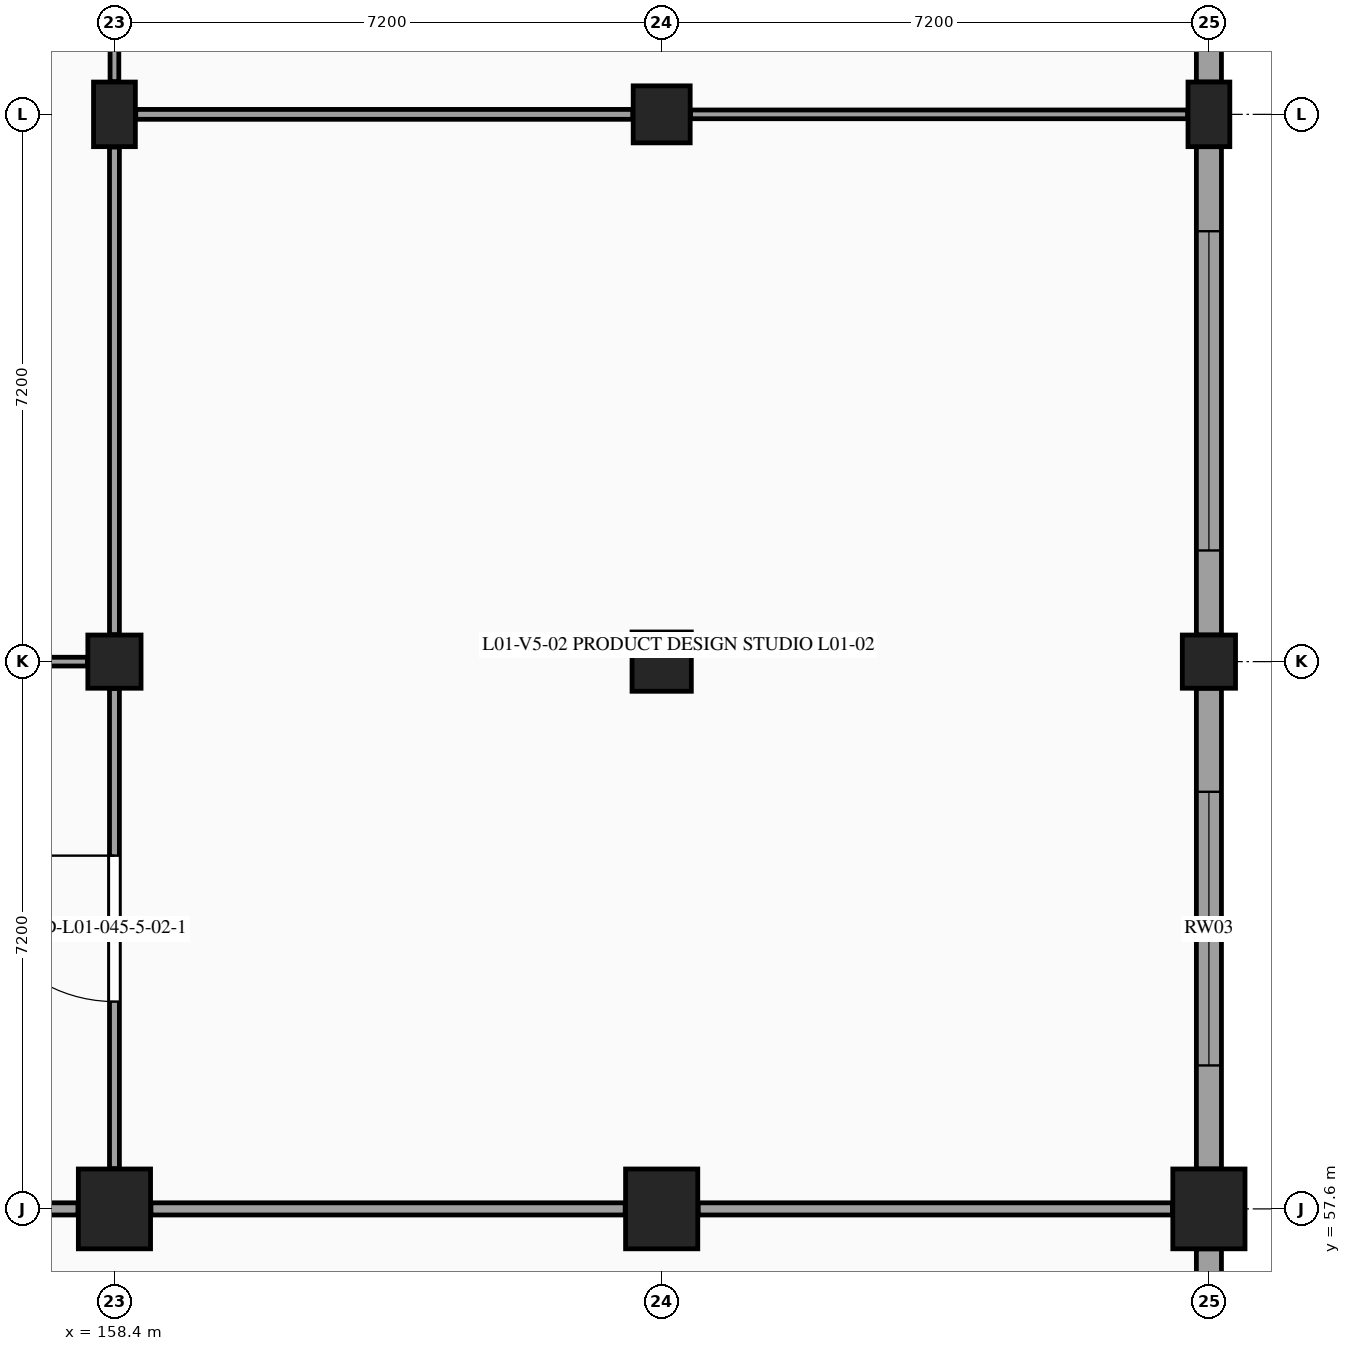
"""IFC4 building model, lengths in metres.
Left out: names, types, materials, properties, quantities, classifications, styles, units other than length and angle.
Written with IfcOpenShell. Run it as: python <this file> out.ifc"""

import sys

from ifc_helpers import new_model, si_unit, direction, frame, frame_2d, origin, origin_2d, place, context, subcontext, project, spatial, rectangle, extrude, element, fill, save


model = new_model("IFC4")
c1 = context("Model", 3, precision=1e-05, world=origin(), true_north=direction((0.0, 1.0)))
c2 = subcontext(c1, "Body", "Model", "MODEL_VIEW")
j1 = project(units=[si_unit("LENGTHUNIT", "METRE"), si_unit("PLANEANGLEUNIT", "RADIAN")], contexts=[c1])
p1 = place(None, origin())
s1 = spatial("IfcSite", under=j1, at=p1, CompositionType="ELEMENT")
p2 = place(p1, origin())
s2 = spatial("IfcBuilding", under=s1, at=p2, CompositionType="ELEMENT")
p3 = place(p2, frame((0.0, 0.0, 5.4)))
s3 = spatial("IfcBuildingStorey", under=s2, at=p3, CompositionType="ELEMENT", Elevation=5.4)
p4 = place(p3, frame((158.4, 57.6, 0.0), z_axis=(0.0, 0.0, 1.0), x_axis=(1.0, 0.0, 0.0)))
e1 = element("IfcColumn", 1, at=p4, inside=s3, PredefinedType="COLUMN", context=c2, shape_type="SweptSolid", body=[
    extrude(rectangle(XDim=0.95, YDim=1.05, at=origin_2d()), origin(), (0.0, 0.0, 1.0), 4.5),
])
p5 = place(p3, frame((158.4, 64.8, 0.0), z_axis=(0.0, 0.0, 1.0), x_axis=(1.0, 0.0, 0.0)))
e2 = element("IfcColumn", 2, at=p5, inside=s3, PredefinedType="COLUMN", context=c2, shape_type="SweptSolid", body=[
    extrude(rectangle(XDim=0.7, YDim=0.7, at=origin_2d()), origin(), (0.0, 0.0, 1.0), 4.5),
])
p6 = place(p3, frame((158.4, 72.0, 0.0), z_axis=(0.0, 0.0, 1.0), x_axis=(1.0, 0.0, 0.0)))
e3 = element("IfcColumn", 3, at=p6, inside=s3, PredefinedType="COLUMN", context=c2, shape_type="SweptSolid", body=[
    extrude(rectangle(XDim=0.55, YDim=0.85, at=origin_2d()), origin(), (0.0, 0.0, 1.0), 4.5),
])
p7 = place(p3, frame((165.6, 57.6, 0.0), z_axis=(0.0, 0.0, 1.0), x_axis=(1.0, 0.0, 0.0)))
e4 = element("IfcColumn", 4, at=p7, inside=s3, PredefinedType="COLUMN", context=c2, shape_type="SweptSolid", body=[
    extrude(rectangle(XDim=0.95, YDim=1.05, at=origin_2d()), origin(), (0.0, 0.0, 1.0), 4.5),
])
p8 = place(p3, frame((165.6, 64.8, 0.0), z_axis=(0.0, 0.0, 1.0), x_axis=(1.0, 0.0, 0.0)))
e5 = element("IfcColumn", 5, at=p8, inside=s3, PredefinedType="COLUMN", context=c2, shape_type="SweptSolid", body=[
    extrude(rectangle(XDim=0.78, YDim=0.78, at=origin_2d()), origin(), (0.0, 0.0, 1.0), 4.5),
])
p9 = place(p3, frame((165.6, 72.0, 0.0), z_axis=(0.0, 0.0, 1.0), x_axis=(1.0, 0.0, 0.0)))
e6 = element("IfcColumn", 6, at=p9, inside=s3, PredefinedType="COLUMN", context=c2, shape_type="SweptSolid", body=[
    extrude(rectangle(XDim=0.75, YDim=0.75, at=origin_2d()), origin(), (0.0, 0.0, 1.0), 4.5),
])
p10 = place(p3, frame((172.8, 57.6, 0.0), z_axis=(0.0, 0.0, 1.0), x_axis=(1.0, 0.0, 0.0)))
e7 = element("IfcColumn", 7, at=p10, inside=s3, PredefinedType="COLUMN", context=c2, shape_type="SweptSolid", body=[
    extrude(rectangle(XDim=0.95, YDim=1.05, at=origin_2d()), origin(), (0.0, 0.0, 1.0), 4.5),
])
p11 = place(p3, frame((172.8, 64.8, 0.0), z_axis=(0.0, 0.0, 1.0), x_axis=(1.0, 0.0, 0.0)))
e8 = element("IfcColumn", 8, at=p11, inside=s3, PredefinedType="COLUMN", context=c2, shape_type="SweptSolid", body=[
    extrude(rectangle(XDim=0.7, YDim=0.7, at=origin_2d()), origin(), (0.0, 0.0, 1.0), 4.5),
])
p12 = place(p3, frame((172.8, 72.0, 0.0), z_axis=(0.0, 0.0, 1.0), x_axis=(1.0, 0.0, 0.0)))
e9 = element("IfcColumn", 9, at=p12, inside=s3, PredefinedType="COLUMN", context=c2, shape_type="SweptSolid", body=[
    extrude(rectangle(XDim=0.55, YDim=0.85, at=origin_2d()), origin(), (0.0, 0.0, 1.0), 4.5),
])
p13 = place(p3, frame((172.8, 78.9, 0.0), z_axis=(0.0, 0.0, 1.0), x_axis=(0.0, -1.0, 0.0)))
e10 = element("IfcWall", 10, at=p13, inside=s3, PredefinedType="STANDARD", context=c2, shape_type="SweptSolid", body=[
    extrude(rectangle(XDim=6.475, YDim=0.33, at=frame_2d((3.237, 0.0))), origin(), (0.0, 0.0, 1.0), 3.455),
])
p14 = place(p13, frame((0.837, 0.0, 0.98)))
e11 = element("IfcOpeningElement", 11, at=p14, cuts=e10, PredefinedType="OPENING", context=c2, shape_type="SweptSolid", body=[
    extrude(rectangle(XDim=4.8, YDim=1.5, at=frame_2d((2.4, 0.75))), frame((0.0, 0.175, 0.0), z_axis=(0.0, -1.0, 0.0), x_axis=(1.0, 0.0, 0.0)), (0.0, 0.0, 1.0), 0.35),
])
p15 = place(p3, frame((172.8, 71.575, 0.0), z_axis=(0.0, 0.0, 1.0), x_axis=(0.0, -1.0, 0.0)))
e12 = element("IfcWall", 12, at=p15, inside=s3, PredefinedType="STANDARD", context=c2, shape_type="SweptSolid", body=[
    extrude(rectangle(XDim=6.425, YDim=0.33, at=frame_2d((3.212, 0.0))), origin(), (0.0, 0.0, 1.0), 3.455),
])
p16 = place(p15, frame((1.113, 0.0, 0.98)))
e13 = element("IfcOpeningElement", 13, at=p16, cuts=e12, PredefinedType="OPENING", context=c2, shape_type="SweptSolid", body=[
    extrude(rectangle(XDim=4.2, YDim=1.5, at=frame_2d((2.1, 0.75))), frame((0.0, 0.175, 0.0), z_axis=(0.0, -1.0, 0.0), x_axis=(1.0, 0.0, 0.0)), (0.0, 0.0, 1.0), 0.35),
])
p17 = place(p3, frame((172.8, 64.45, 0.0), z_axis=(0.0, 0.0, 1.0), x_axis=(0.0, -1.0, 0.0)))
e14 = element("IfcWall", 14, at=p17, inside=s3, PredefinedType="STANDARD", context=c2, shape_type="SweptSolid", body=[
    extrude(rectangle(XDim=6.325, YDim=0.33, at=frame_2d((3.163, 0.0))), origin(), (0.0, 0.0, 1.0), 3.455),
])
p18 = place(p17, frame((1.363, 0.0, 0.98)))
e15 = element("IfcOpeningElement", 15, at=p18, cuts=e14, PredefinedType="OPENING", context=c2, shape_type="SweptSolid", body=[
    extrude(rectangle(XDim=3.6, YDim=1.5, at=frame_2d((1.8, 0.75))), frame((0.0, 0.175, 0.0), z_axis=(0.0, -1.0, 0.0), x_axis=(1.0, 0.0, 0.0)), (0.0, 0.0, 1.0), 0.35),
])
p19 = place(p3, frame((172.8, 57.075, 0.0), z_axis=(0.0, 0.0, 1.0), x_axis=(0.0, -1.0, 0.0)))
e16 = element("IfcWall", 16, at=p19, inside=s3, PredefinedType="STANDARD", context=c2, shape_type="SweptSolid", body=[
    extrude(rectangle(XDim=6.15, YDim=0.33, at=frame_2d((3.075, 0.0))), origin(), (0.0, 0.0, 1.0), 3.745),
])
p20 = place(p3, frame((151.68, 57.6, 0.0), z_axis=(0.0, 0.0, 1.0), x_axis=(1.0, 0.0, 0.0)))
e17 = element("IfcWall", 17, at=p20, inside=s3, PredefinedType="PARTITIONING", context=c2, shape_type="SweptSolid", body=[
    extrude(rectangle(XDim=6.24, YDim=0.16, at=frame_2d((3.12, 0.0))), origin(), (0.0, 0.0, 1.0), 3.47),
])
p21 = place(p3, frame((158.4, 58.13, 0.0), z_axis=(0.0, 0.0, 1.0), x_axis=(0.0, 1.0, 0.0)))
e18 = element("IfcWall", 18, at=p21, inside=s3, PredefinedType="PARTITIONING", context=c2, shape_type="SweptSolid", body=[
    extrude(rectangle(XDim=6.315, YDim=0.13, at=frame_2d((3.158, 0.0))), origin(), (0.0, 0.0, 1.0), 3.525),
])
p22 = place(p21, frame((2.198, 0.0, 0.0)))
e19 = element("IfcOpeningElement", 19, at=p22, cuts=e18, PredefinedType="OPENING", context=c2, shape_type="SweptSolid", body=[
    extrude(rectangle(XDim=1.92, YDim=2.35, at=frame_2d((0.96, 1.175))), frame((0.0, 0.075, 0.0), z_axis=(0.0, -1.0, 0.0), x_axis=(1.0, 0.0, 0.0)), (0.0, 0.0, 1.0), 0.15),
])
p23 = place(p3, frame((151.595, 64.8, 0.0), z_axis=(0.0, 0.0, 1.0), x_axis=(1.0, 0.0, 0.0)))
e20 = element("IfcWall", 20, at=p23, inside=s3, PredefinedType="PARTITIONING", context=c2, shape_type="SweptSolid", body=[
    extrude(rectangle(XDim=6.45, YDim=0.115, at=frame_2d((3.225, 0.0))), origin(), (0.0, 0.0, 1.0), 3.47),
])
p24 = place(p3, frame((158.4, 65.155, 0.0), z_axis=(0.0, 0.0, 1.0), x_axis=(0.0, 1.0, 0.0)))
e21 = element("IfcWall", 21, at=p24, inside=s3, PredefinedType="PARTITIONING", context=c2, shape_type="SweptSolid", body=[
    extrude(rectangle(XDim=6.415, YDim=0.13, at=frame_2d((3.208, 0.0))), origin(), (0.0, 0.0, 1.0), 3.52),
])
p25 = place(p3, frame((158.4, 72.43, 0.0), z_axis=(0.0, 0.0, 1.0), x_axis=(0.0, 1.0, 0.0)))
e22 = element("IfcWall", 22, at=p25, inside=s3, PredefinedType="PARTITIONING", context=c2, shape_type="SweptSolid", body=[
    extrude(rectangle(XDim=6.465, YDim=0.115, at=frame_2d((3.232, 0.0))), origin(), (0.0, 0.0, 1.0), 3.515),
])
p26 = place(p25, frame((2.452, 0.0, 0.0)))
e23 = element("IfcOpeningElement", 23, at=p26, cuts=e22, PredefinedType="OPENING", context=c2, shape_type="SweptSolid", body=[
    extrude(rectangle(XDim=1.56, YDim=2.25, at=frame_2d((0.78, 1.125))), frame((0.0, 0.067, 0.0), z_axis=(0.0, -1.0, 0.0), x_axis=(1.0, 0.0, 0.0)), (0.0, 0.0, 1.0), 0.135),
])
p27 = place(p3, frame((158.88, 57.6, 0.0), z_axis=(0.0, 0.0, 1.0), x_axis=(1.0, 0.0, 0.0)))
e24 = element("IfcWall", 24, at=p27, inside=s3, PredefinedType="PARTITIONING", context=c2, shape_type="SweptSolid", body=[
    extrude(rectangle(XDim=6.24, YDim=0.16, at=frame_2d((3.12, 0.0))), origin(), (0.0, 0.0, 1.0), 3.485),
])
p28 = place(p3, frame((158.68, 72.0, 0.0), z_axis=(0.0, 0.0, 1.0), x_axis=(1.0, 0.0, 0.0)))
e25 = element("IfcWall", 25, at=p28, inside=s3, PredefinedType="PARTITIONING", context=c2, shape_type="SweptSolid", body=[
    extrude(rectangle(XDim=6.54, YDim=0.13, at=frame_2d((3.27, 0.0))), origin(), (0.0, 0.0, 1.0), 3.485),
])
p29 = place(p3, frame((166.08, 57.6, 0.0), z_axis=(0.0, 0.0, 1.0), x_axis=(1.0, 0.0, 0.0)))
e26 = element("IfcWall", 26, at=p29, inside=s3, PredefinedType="PARTITIONING", context=c2, shape_type="SweptSolid", body=[
    extrude(rectangle(XDim=6.24, YDim=0.16, at=frame_2d((3.12, 0.0))), origin(), (0.0, 0.0, 1.0), 3.49),
])
p30 = place(p3, frame((165.98, 72.0, 0.0), z_axis=(0.0, 0.0, 1.0), x_axis=(1.0, 0.0, 0.0)))
e27 = element("IfcWall", 27, at=p30, inside=s3, PredefinedType="PARTITIONING", context=c2, shape_type="SweptSolid", body=[
    extrude(rectangle(XDim=6.54, YDim=0.115, at=frame_2d((3.27, 0.0))), origin(), (0.0, 0.0, 1.0), 3.49),
])
p31 = place(p16, origin())
e28 = element("IfcWindow", 28, at=p31, inside=s3, PartitioningType="SINGLE_PANEL", PredefinedType="WINDOW", context=c2, shape_type="SweptSolid", body=[
    extrude(rectangle(XDim=4.2, YDim=1.5, at=frame_2d((2.1, 0.75))), frame((0.0, -0.03, 0.0), z_axis=(0.0, -1.0, 0.0), x_axis=(1.0, 0.0, 0.0)), (0.0, 0.0, 1.0), 0.06),
])
fill(e13, e28)
p32 = place(p18, origin())
e29 = element("IfcWindow", 29, at=p32, inside=s3, PartitioningType="SINGLE_PANEL", PredefinedType="WINDOW", context=c2, shape_type="SweptSolid", body=[
    extrude(rectangle(XDim=3.6, YDim=1.5, at=frame_2d((1.8, 0.75))), frame((0.0, -0.03, 0.0), z_axis=(0.0, -1.0, 0.0), x_axis=(1.0, 0.0, 0.0)), (0.0, 0.0, 1.0), 0.06),
])
fill(e15, e29)
p33 = place(p22, origin())
e30 = element("IfcDoor", 30, at=p33, inside=s3, OperationType="SINGLE_SWING_RIGHT", PredefinedType="DOOR", context=c2, shape_type="SweptSolid", body=[
    extrude(rectangle(XDim=1.92, YDim=2.35, at=frame_2d((0.96, 1.175))), frame((0.0, 0.025, 0.0), z_axis=(0.0, -1.0, 0.0), x_axis=(1.0, 0.0, 0.0)), (0.0, 0.0, 1.0), 0.05),
])
fill(e19, e30)
save(model, sys.argv[1])
